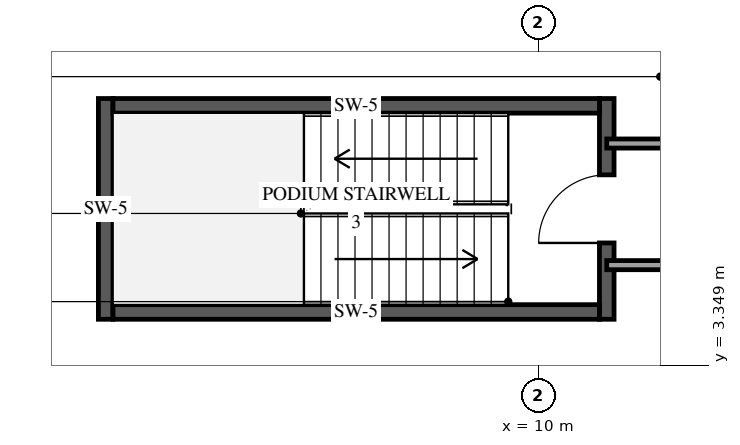
"""IFC4 building model, lengths in metres.
Left out: names, types, materials, properties, quantities, classifications, styles, units other than length and angle.
Written with IfcOpenShell. Run it as: python <this file> out.ifc"""

import sys

from ifc_helpers import new_model, si_unit, direction, frame, frame_2d, origin, place, context, subcontext, project, spatial, rectangle, extrude, element, fill, save


model = new_model("IFC4")
c1 = context("Model", 3, precision=1e-05, world=origin(), true_north=direction((0.0, 1.0)))
c2 = subcontext(c1, "Body", "Model", "MODEL_VIEW")
j1 = project(units=[si_unit("LENGTHUNIT", "METRE"), si_unit("PLANEANGLEUNIT", "RADIAN")], contexts=[c1])
p1 = place(None, origin())
s1 = spatial("IfcSite", under=j1, at=p1, CompositionType="ELEMENT")
p2 = place(p1, origin())
s2 = spatial("IfcBuilding", under=s1, at=p2, CompositionType="ELEMENT")
p3 = place(p2, frame((0.0, 0.0, 16.2)))
s3 = spatial("IfcBuildingStorey", under=s2, at=p3, CompositionType="ELEMENT", Elevation=16.2)
p4 = place(p3, frame((2.88, 4.11, 0.0), z_axis=(0.0, 0.0, 1.0), x_axis=(0.0, 1.0, 0.0)))
e1 = element("IfcWall", 1, at=p4, inside=s3, PredefinedType="SHEAR", context=c2, shape_type="SweptSolid", body=[
    extrude(rectangle(XDim=3.63, YDim=0.24, at=frame_2d((1.815, 0.0))), origin(), (0.0, 0.0, 1.0), 4.5),
])
p5 = place(p3, frame((11.12, 4.11, 0.0), z_axis=(0.0, 0.0, 1.0), x_axis=(0.0, 1.0, 0.0)))
e2 = element("IfcWall", 2, at=p5, inside=s3, PredefinedType="SHEAR", context=c2, shape_type="SweptSolid", body=[
    extrude(rectangle(XDim=3.63, YDim=0.24, at=frame_2d((1.815, 0.0))), origin(), (0.0, 0.0, 1.0), 4.5),
])
p6 = place(p5, frame((1.255, 0.0, 0.0)))
e3 = element("IfcOpeningElement", 3, at=p6, cuts=e2, PredefinedType="OPENING", context=c2, shape_type="SweptSolid", body=[
    extrude(rectangle(XDim=1.12, YDim=2.15, at=frame_2d((0.56, 1.075))), frame((0.0, 0.13, 0.0), z_axis=(0.0, -1.0, 0.0), x_axis=(1.0, 0.0, 0.0)), (0.0, 0.0, 1.0), 0.26),
])
for number, where, z_axis, x_axis in (
    (4, (3.0, 4.23, 0.0), (0.0, 0.0, 1.0), (1.0, 0.0, 0.0)),
    (5, (3.0, 7.62, 0.0), (0.0, 0.0, 1.0), (1.0, 0.0, 0.0)),
):
    element("IfcWall", number, at=place(p3, frame(where, z_axis=z_axis, x_axis=x_axis)), inside=s3, PredefinedType="SHEAR", context=c2, shape_type="SweptSolid", body=[
        extrude(rectangle(XDim=8.0, YDim=0.24, at=frame_2d((4.0, 0.0))), origin(), (0.0, 0.0, 1.0), 4.5),
    ])
p7 = place(p3, frame((46.73, 5.0, 0.0), z_axis=(0.0, 0.0, 1.0), x_axis=(-1.0, 0.0, 0.0)))
e6 = element("IfcWall", 6, at=p7, inside=s3, PredefinedType="PARTITIONING", context=c2, shape_type="SweptSolid", body=[
    extrude(rectangle(XDim=35.61, YDim=0.15, at=frame_2d((17.805, 0.0))), origin(), (0.0, 0.0, 1.0), 4.18),
])
p8 = place(p7, frame((17.33, 0.0, 0.0)))
e7 = element("IfcOpeningElement", 7, at=p8, cuts=e6, PredefinedType="OPENING", context=c2, shape_type="SweptSolid", body=[
    extrude(rectangle(XDim=0.92, YDim=2.12, at=frame_2d((0.46, 1.06))), frame((0.0, 0.085, 0.0), z_axis=(0.0, -1.0, 0.0), x_axis=(1.0, 0.0, 0.0)), (0.0, 0.0, 1.0), 0.17),
])
p9 = place(p3, frame((11.12, 7.0, 0.0), z_axis=(0.0, 0.0, 1.0), x_axis=(1.0, 0.0, 0.0)))
e8 = element("IfcWall", 8, at=p9, inside=s3, PredefinedType="PARTITIONING", context=c2, shape_type="SweptSolid", body=[
    extrude(rectangle(XDim=19.41, YDim=0.15, at=frame_2d((9.705, 0.0))), origin(), (0.0, 0.0, 1.0), 4.18),
])
p10 = place(p6, origin())
e9 = element("IfcDoor", 9, at=p10, inside=s3, OperationType="SINGLE_SWING_LEFT", PredefinedType="DOOR", context=c2, shape_type="SweptSolid", body=[
    extrude(rectangle(XDim=1.12, YDim=2.15, at=frame_2d((0.56, 1.075))), frame((0.0, 0.025, 0.0), z_axis=(0.0, -1.0, 0.0), x_axis=(1.0, 0.0, 0.0)), (0.0, 0.0, 1.0), 0.05),
])
fill(e3, e9)
save(model, sys.argv[1])
